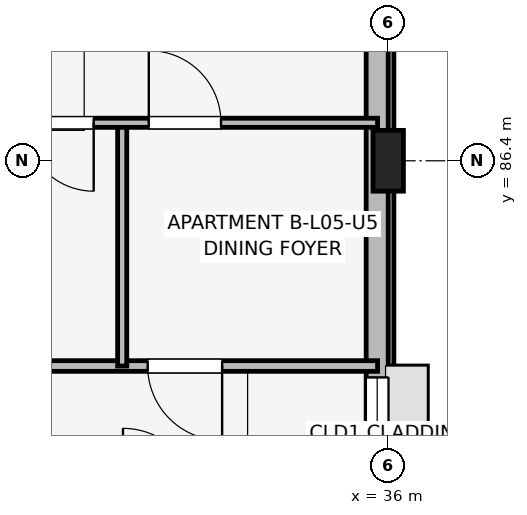
"""IFC4 building model, lengths in metres.
Left out: names, types, materials, properties, quantities, classifications, styles, units other than length and angle.
Written with IfcOpenShell. Run it as: python <this file> out.ifc"""

import sys

from ifc_helpers import new_model, si_unit, direction, frame, frame_2d, origin, origin_2d, place, context, subcontext, project, spatial, rectangle, extrude, element, fill, save


model = new_model("IFC4")
c1 = context("Model", 3, precision=1e-05, world=origin(), true_north=direction((0.0, 1.0)))
c2 = subcontext(c1, "Body", "Model", "MODEL_VIEW")
j1 = project(units=[si_unit("LENGTHUNIT", "METRE"), si_unit("PLANEANGLEUNIT", "RADIAN")], contexts=[c1])
p1 = place(None, origin())
s1 = spatial("IfcSite", under=j1, at=p1, CompositionType="ELEMENT")
p2 = place(p1, origin())
s2 = spatial("IfcBuilding", under=s1, at=p2, CompositionType="ELEMENT")
p3 = place(p2, frame((0.0, 0.0, 18.15)))
s3 = spatial("IfcBuildingStorey", under=s2, at=p3, CompositionType="ELEMENT", Elevation=18.15)
p4 = place(p3, frame((36.0, 86.4, 0.0), z_axis=(0.0, 0.0, 1.0), x_axis=(1.0, 0.0, 0.0)))
e1 = element("IfcColumn", 1, at=p4, inside=s3, PredefinedType="COLUMN", context=c2, shape_type="SweptSolid", body=[
    extrude(rectangle(XDim=0.4, YDim=0.8, at=origin_2d()), origin(), (0.0, 0.0, 1.0), 3.15),
])
p5 = place(p3, frame((35.855, 75.2, 0.0), z_axis=(0.0, 0.0, 1.0), x_axis=(0.0, 1.0, 0.0)))
e2 = element("IfcWall", 2, at=p5, inside=s3, PredefinedType="SOLIDWALL", context=c2, shape_type="SweptSolid", body=[
    extrude(rectangle(XDim=15.2, YDim=0.29, at=frame_2d((7.6, 0.0))), origin(), (0.0, 0.0, 1.0), 2.38),
])
p6 = place(p5, frame((6.85, 0.0, 1.05)))
e3 = element("IfcOpeningElement", 3, at=p6, cuts=e2, PredefinedType="OPENING", context=c2, shape_type="SweptSolid", body=[
    extrude(rectangle(XDim=1.5, YDim=1.15, at=frame_2d((0.75, 0.575))), frame((0.0, 0.155, 0.0), z_axis=(0.0, -1.0, 0.0), x_axis=(1.0, 0.0, 0.0)), (0.0, 0.0, 1.0), 0.31),
])
p7 = place(p5, frame((12.685, 0.0, 0.72)))
e4 = element("IfcOpeningElement", 4, at=p7, cuts=e2, PredefinedType="OPENING", context=c2, shape_type="SweptSolid", body=[
    extrude(rectangle(XDim=1.3, YDim=1.55, at=frame_2d((0.65, 0.775))), frame((0.0, 0.155, 0.0), z_axis=(0.0, -1.0, 0.0), x_axis=(1.0, 0.0, 0.0)), (0.0, 0.0, 1.0), 0.31),
])
p8 = place(p3, frame((28.94, 83.7, 0.0), z_axis=(0.0, 0.0, 1.0), x_axis=(1.0, 0.0, 0.0)))
e5 = element("IfcWall", 5, at=p8, inside=s3, PredefinedType="PARTITIONING", context=c2, shape_type="SweptSolid", body=[
    extrude(rectangle(XDim=6.92, YDim=0.14, at=frame_2d((3.46, 0.0))), origin(), (0.0, 0.0, 1.0), 2.38),
])
p9 = place(p8, frame((4.875, 0.0, 0.0), z_axis=(0.0, 0.0, 1.0), x_axis=(-1.0, 0.0, 0.0)))
e6 = element("IfcOpeningElement", 6, at=p9, cuts=e5, PredefinedType="OPENING", context=c2, shape_type="SweptSolid", body=[
    extrude(rectangle(XDim=0.98, YDim=2.1, at=frame_2d((0.49, 1.05))), frame((0.0, 0.08, 0.0), z_axis=(0.0, -1.0, 0.0), x_axis=(1.0, 0.0, 0.0)), (0.0, 0.0, 1.0), 0.16),
])
p10 = place(p3, frame((32.5, 83.7, 0.0), z_axis=(0.0, 0.0, 1.0), x_axis=(0.0, 1.0, 0.0)))
e7 = element("IfcWall", 7, at=p10, inside=s3, PredefinedType="PARTITIONING", context=c2, shape_type="SweptSolid", body=[
    extrude(rectangle(XDim=3.2, YDim=0.12, at=frame_2d((1.6, 0.0))), origin(), (0.0, 0.0, 1.0), 2.375),
])
p11 = place(p3, frame((28.94, 86.9, 0.0), z_axis=(0.0, 0.0, 1.0), x_axis=(1.0, 0.0, 0.0)))
e8 = element("IfcWall", 8, at=p11, inside=s3, PredefinedType="PARTITIONING", context=c2, shape_type="SweptSolid", body=[
    extrude(rectangle(XDim=6.92, YDim=0.12, at=frame_2d((3.46, 0.0))), origin(), (0.0, 0.0, 1.0), 2.38),
])
p12 = place(p11, frame((0.53, 0.0, 0.0)))
e9 = element("IfcOpeningElement", 9, at=p12, cuts=e8, PredefinedType="OPENING", context=c2, shape_type="SweptSolid", body=[
    extrude(rectangle(XDim=0.85, YDim=2.08, at=frame_2d((0.425, 1.04))), frame((0.0, 0.07, 0.0), z_axis=(0.0, -1.0, 0.0), x_axis=(1.0, 0.0, 0.0)), (0.0, 0.0, 1.0), 0.14),
])
p13 = place(p11, frame((3.185, 0.0, 0.0), z_axis=(0.0, 0.0, 1.0), x_axis=(-1.0, 0.0, 0.0)))
e10 = element("IfcOpeningElement", 10, at=p13, cuts=e8, PredefinedType="OPENING", context=c2, shape_type="SweptSolid", body=[
    extrude(rectangle(XDim=0.9, YDim=2.08, at=frame_2d((0.45, 1.04))), frame((0.0, 0.07, 0.0), z_axis=(0.0, -1.0, 0.0), x_axis=(1.0, 0.0, 0.0)), (0.0, 0.0, 1.0), 0.14),
])
p14 = place(p11, frame((3.91, 0.0, 0.0)))
e11 = element("IfcOpeningElement", 11, at=p14, cuts=e8, PredefinedType="OPENING", context=c2, shape_type="SweptSolid", body=[
    extrude(rectangle(XDim=0.95, YDim=2.08, at=frame_2d((0.475, 1.04))), frame((0.0, 0.07, 0.0), z_axis=(0.0, -1.0, 0.0), x_axis=(1.0, 0.0, 0.0)), (0.0, 0.0, 1.0), 0.14),
])
p15 = place(p6, origin())
e12 = element("IfcWindow", 12, at=p15, inside=s3, PartitioningType="SINGLE_PANEL", PredefinedType="WINDOW", context=c2, shape_type="SweptSolid", body=[
    extrude(rectangle(XDim=1.5, YDim=1.15, at=frame_2d((0.75, 0.575))), frame((0.0, 0.03, 0.0), z_axis=(0.0, -1.0, 0.0), x_axis=(1.0, 0.0, 0.0)), (0.0, 0.0, 1.0), 0.06),
])
fill(e3, e12)
p16 = place(p9, origin())
e13 = element("IfcDoor", 13, at=p16, inside=s3, OperationType="SINGLE_SWING_RIGHT", PredefinedType="DOOR", context=c2, shape_type="SweptSolid", body=[
    extrude(rectangle(XDim=0.98, YDim=2.1, at=frame_2d((0.49, 1.05))), frame((0.0, 0.025, 0.0), z_axis=(0.0, -1.0, 0.0), x_axis=(1.0, 0.0, 0.0)), (0.0, 0.0, 1.0), 0.05),
])
fill(e6, e13)
p17 = place(p13, origin())
e14 = element("IfcDoor", 14, at=p17, inside=s3, OperationType="SINGLE_SWING_RIGHT", PredefinedType="DOOR", context=c2, shape_type="SweptSolid", body=[
    extrude(rectangle(XDim=0.9, YDim=2.08, at=frame_2d((0.45, 1.04))), frame((0.0, 0.025, 0.0), z_axis=(0.0, -1.0, 0.0), x_axis=(1.0, 0.0, 0.0)), (0.0, 0.0, 1.0), 0.05),
])
fill(e10, e14)
p18 = place(p14, origin())
e15 = element("IfcDoor", 15, at=p18, inside=s3, OperationType="SINGLE_SWING_LEFT", PredefinedType="DOOR", context=c2, shape_type="SweptSolid", body=[
    extrude(rectangle(XDim=0.95, YDim=2.08, at=frame_2d((0.475, 1.04))), frame((0.0, 0.025, 0.0), z_axis=(0.0, -1.0, 0.0), x_axis=(1.0, 0.0, 0.0)), (0.0, 0.0, 1.0), 0.05),
])
fill(e11, e15)
save(model, sys.argv[1])
